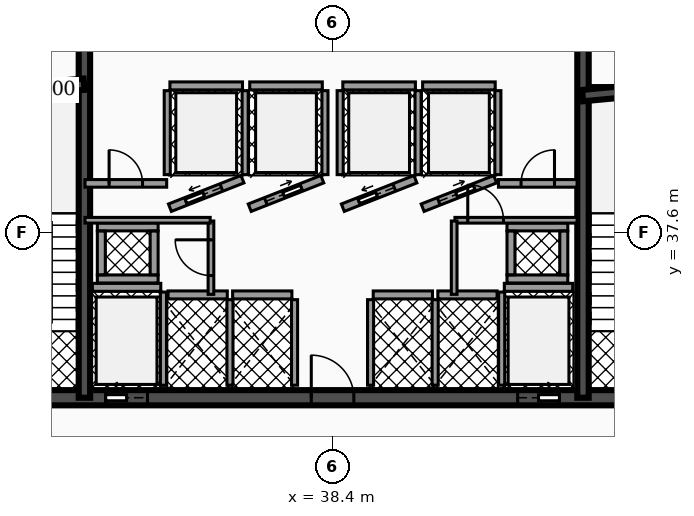
"""IFC4 building model, lengths in metres.
Left out: names, types, materials, properties, quantities, classifications, styles, units other than length and angle.
Written with IfcOpenShell. Run it as: python <this file> out.ifc"""

import sys

from ifc_helpers import new_model, si_unit, direction, frame, frame_2d, origin, place, context, subcontext, project, spatial, rectangle, extrude, element, fill, save


model = new_model("IFC4")
c1 = context("Model", 3, precision=1e-05, world=origin(), true_north=direction((0.0, 1.0)))
c2 = subcontext(c1, "Body", "Model", "MODEL_VIEW")
j1 = project(units=[si_unit("LENGTHUNIT", "METRE"), si_unit("PLANEANGLEUNIT", "RADIAN")], contexts=[c1])
p1 = place(None, origin())
s1 = spatial("IfcSite", under=j1, at=p1, CompositionType="ELEMENT")
p2 = place(p1, origin())
s2 = spatial("IfcBuilding", under=s1, at=p2, CompositionType="ELEMENT")
p3 = place(p2, frame((0.0, 0.0, 96.9)))
s3 = spatial("IfcBuildingStorey", under=s2, at=p3, CompositionType="ELEMENT", Elevation=96.9)
p4 = place(p3, frame((28.4, 33.25, 0.0), z_axis=(0.0, 0.0, 1.0), x_axis=(1.0, 0.0, 0.0)))
e1 = element("IfcWall", 1, at=p4, inside=s3, PredefinedType="SHEAR", context=c2, shape_type="SweptSolid", body=[
    extrude(rectangle(XDim=20.06, YDim=0.4, at=frame_2d((10.03, 0.0))), origin(), (0.0, 0.0, 1.0), 3.82),
])
p5 = place(p4, frame((4.03, 0.0, 0.0)))
e2 = element("IfcOpeningElement", 2, at=p5, cuts=e1, PredefinedType="OPENING", context=c2, shape_type="SweptSolid", body=[
    extrude(rectangle(XDim=1.1, YDim=2.15, at=frame_2d((0.55, 1.075))), frame((0.0, 0.21, 0.0), z_axis=(0.0, -1.0, 0.0), x_axis=(1.0, 0.0, 0.0)), (0.0, 0.0, 1.0), 0.42),
])
p6 = place(p4, frame((14.87, 0.0, 0.0)))
e3 = element("IfcOpeningElement", 3, at=p6, cuts=e1, PredefinedType="OPENING", context=c2, shape_type="SweptSolid", body=[
    extrude(rectangle(XDim=1.1, YDim=2.15, at=frame_2d((0.55, 1.075))), frame((0.0, 0.21, 0.0), z_axis=(0.0, -1.0, 0.0), x_axis=(1.0, 0.0, 0.0)), (0.0, 0.0, 1.0), 0.42),
])
p7 = place(p4, frame((1.31, 0.0, 0.0)))
e4 = element("IfcOpeningElement", 4, at=p7, cuts=e1, PredefinedType="OPENING", context=c2, shape_type="SweptSolid", body=[
    extrude(rectangle(XDim=1.1, YDim=2.2, at=frame_2d((0.55, 1.1))), frame((0.0, 0.21, 0.0), z_axis=(0.0, -1.0, 0.0), x_axis=(1.0, 0.0, 0.0)), (0.0, 0.0, 1.0), 0.42),
])
p8 = place(p4, frame((9.44, 0.0, 0.0)))
e5 = element("IfcOpeningElement", 5, at=p8, cuts=e1, PredefinedType="OPENING", context=c2, shape_type="SweptSolid", body=[
    extrude(rectangle(XDim=1.12, YDim=2.05, at=frame_2d((0.56, 1.025))), frame((0.0, 0.21, 0.0), z_axis=(0.0, -1.0, 0.0), x_axis=(1.0, 0.0, 0.0)), (0.0, 0.0, 1.0), 0.42),
])
p9 = place(p4, frame((17.65, 0.0, 0.0)))
e6 = element("IfcOpeningElement", 6, at=p9, cuts=e1, PredefinedType="OPENING", context=c2, shape_type="SweptSolid", body=[
    extrude(rectangle(XDim=1.1, YDim=2.2, at=frame_2d((0.55, 1.1))), frame((0.0, 0.21, 0.0), z_axis=(0.0, -1.0, 0.0), x_axis=(1.0, 0.0, 0.0)), (0.0, 0.0, 1.0), 0.42),
])
for number, where, z_axis, x_axis in (
    (7, (31.87, 33.25, 0.0), (0.0, 0.0, 1.0), (0.0, 1.0, 0.0)),
    (8, (44.99, 33.25, 0.0), (0.0, 0.0, 1.0), (0.0, 1.0, 0.0)),
):
    element("IfcWall", number, at=place(p3, frame(where, z_axis=z_axis, x_axis=x_axis)), inside=s3, PredefinedType="SHEAR", context=c2, shape_type="SweptSolid", body=[
        extrude(rectangle(XDim=10.2, YDim=0.3, at=frame_2d((5.1, 0.0))), origin(), (0.0, 0.0, 1.0), 3.82),
    ])
p10 = place(p3, frame((28.64, 41.2, 0.0), z_axis=(0.0, 0.0, 1.0), x_axis=(0.995687118776, 0.092774789157, 0.0)))
e9 = element("IfcWall", 9, at=p10, inside=s3, PredefinedType="SHEAR", context=c2, shape_type="SweptSolid", body=[
    extrude(rectangle(XDim=3.234, YDim=0.3, at=frame_2d((1.617, 0.0))), origin(), (0.0, 0.0, 1.0), 3.82),
])
p11 = place(p3, frame((44.98, 41.2, 0.0), z_axis=(0.0, 0.0, 1.0), x_axis=(0.995686468965, 0.09278176286, 0.0)))
e10 = element("IfcWall", 10, at=p11, inside=s3, PredefinedType="SHEAR", context=c2, shape_type="SweptSolid", body=[
    extrude(rectangle(XDim=3.234, YDim=0.3, at=frame_2d((1.617, 0.0))), origin(), (0.0, 0.0, 1.0), 3.82),
])
p12 = place(p3, frame((32.08, 36.155, 0.0), z_axis=(0.0, 0.0, 1.0), x_axis=(1.0, 0.0, 0.0)))
e11 = element("IfcWall", 11, at=p12, inside=s3, PredefinedType="SOLIDWALL", context=c2, shape_type="SweptSolid", body=[
    extrude(rectangle(XDim=1.8, YDim=0.21, at=frame_2d((0.9, 0.0))), origin(), (0.0, 0.0, 1.0), 2.792),
])
p13 = place(p3, frame((33.95, 33.58, 0.0), z_axis=(0.0, 0.0, 1.0), x_axis=(0.0, 1.0, 0.0)))
e12 = element("IfcWall", 12, at=p13, inside=s3, PredefinedType="SOLIDWALL", context=c2, shape_type="SweptSolid", body=[
    extrude(rectangle(XDim=2.45, YDim=0.16, at=frame_2d((1.225, 0.0))), origin(), (0.0, 0.0, 1.0), 2.792),
])
p14 = place(p3, frame((42.92, 36.155, 0.0), z_axis=(0.0, 0.0, 1.0), x_axis=(1.0, 0.0, 0.0)))
e13 = element("IfcWall", 13, at=p14, inside=s3, PredefinedType="SOLIDWALL", context=c2, shape_type="SweptSolid", body=[
    extrude(rectangle(XDim=1.8, YDim=0.21, at=frame_2d((0.9, 0.0))), origin(), (0.0, 0.0, 1.0), 2.792),
])
p15 = place(p3, frame((42.85, 33.58, 0.0), z_axis=(0.0, 0.0, 1.0), x_axis=(0.0, 1.0, 0.0)))
e14 = element("IfcWall", 14, at=p15, inside=s3, PredefinedType="SOLIDWALL", context=c2, shape_type="SweptSolid", body=[
    extrude(rectangle(XDim=2.45, YDim=0.16, at=frame_2d((1.225, 0.0))), origin(), (0.0, 0.0, 1.0), 2.792),
])
p16 = place(p3, frame((34.12, 38.25, 0.0), z_axis=(0.0, 0.0, 1.0), x_axis=(0.930804993012, 0.36551616241, 0.0)))
e15 = element("IfcWall", 15, at=p16, inside=s3, PredefinedType="SOLIDWALL", context=c2, shape_type="SweptSolid", body=[
    extrude(rectangle(XDim=2.052, YDim=0.21, at=frame_2d((1.026, 0.0))), origin(), (0.0, 0.0, 1.0), 2.792),
])
p17 = place(p16, frame((0.455, 0.0, 0.0)))
e16 = element("IfcOpeningElement", 16, at=p17, cuts=e15, PredefinedType="OPENING", context=c2, shape_type="SweptSolid", body=[
    extrude(rectangle(XDim=1.0, YDim=2.1, at=frame_2d((0.5, 1.05))), frame((0.0, 0.115, 0.0), z_axis=(0.0, -1.0, 0.0), x_axis=(1.0, 0.0, 0.0)), (0.0, 0.0, 1.0), 0.23),
])
p18 = place(p3, frame((34.12, 41.455, 0.0), z_axis=(0.0, 0.0, 1.0), x_axis=(1.0, 0.0, 0.0)))
e17 = element("IfcWall", 17, at=p18, inside=s3, PredefinedType="SOLIDWALL", context=c2, shape_type="SweptSolid", body=[
    extrude(rectangle(XDim=1.91, YDim=0.21, at=frame_2d((0.955, 0.0))), origin(), (0.0, 0.0, 1.0), 2.792),
])
for number, where, z_axis, x_axis in (
    (18, (34.05, 39.12, 0.0), (0.0, 0.0, 1.0), (0.0, 1.0, 0.0)),
    (19, (36.1, 39.12, 0.0), (0.0, 0.0, 1.0), (0.0, 1.0, 0.0)),
):
    element("IfcWall", number, at=place(p3, frame(where, z_axis=z_axis, x_axis=x_axis)), inside=s3, PredefinedType="SOLIDWALL", context=c2, shape_type="SweptSolid", body=[
        extrude(rectangle(XDim=2.21, YDim=0.16, at=frame_2d((1.105, 0.0))), origin(), (0.0, 0.0, 1.0), 2.792),
    ])
p19 = place(p3, frame((36.22, 38.25, 0.0), z_axis=(0.0, 0.0, 1.0), x_axis=(0.930804993012, 0.36551616241, 0.0)))
e20 = element("IfcWall", 20, at=p19, inside=s3, PredefinedType="SOLIDWALL", context=c2, shape_type="SweptSolid", body=[
    extrude(rectangle(XDim=2.052, YDim=0.21, at=frame_2d((1.026, 0.0))), origin(), (0.0, 0.0, 1.0), 2.792),
])
p20 = place(p19, frame((0.455, 0.0, 0.0)))
e21 = element("IfcOpeningElement", 21, at=p20, cuts=e20, PredefinedType="OPENING", context=c2, shape_type="SweptSolid", body=[
    extrude(rectangle(XDim=1.0, YDim=2.1, at=frame_2d((0.5, 1.05))), frame((0.0, 0.115, 0.0), z_axis=(0.0, -1.0, 0.0), x_axis=(1.0, 0.0, 0.0)), (0.0, 0.0, 1.0), 0.23),
])
p21 = place(p3, frame((36.22, 41.455, 0.0), z_axis=(0.0, 0.0, 1.0), x_axis=(1.0, 0.0, 0.0)))
e22 = element("IfcWall", 22, at=p21, inside=s3, PredefinedType="SOLIDWALL", context=c2, shape_type="SweptSolid", body=[
    extrude(rectangle(XDim=1.91, YDim=0.21, at=frame_2d((0.955, 0.0))), origin(), (0.0, 0.0, 1.0), 2.792),
])
p22 = place(p3, frame((38.2, 39.12, 0.0), z_axis=(0.0, 0.0, 1.0), x_axis=(0.0, 1.0, 0.0)))
e23 = element("IfcWall", 23, at=p22, inside=s3, PredefinedType="SOLIDWALL", context=c2, shape_type="SweptSolid", body=[
    extrude(rectangle(XDim=2.21, YDim=0.16, at=frame_2d((1.105, 0.0))), origin(), (0.0, 0.0, 1.0), 2.792),
])
p23 = place(p3, frame((38.67, 38.25, 0.0), z_axis=(0.0, 0.0, 1.0), x_axis=(0.930820886763, 0.3654756856, 0.0)))
e24 = element("IfcWall", 24, at=p23, inside=s3, PredefinedType="SOLIDWALL", context=c2, shape_type="SweptSolid", body=[
    extrude(rectangle(XDim=2.052, YDim=0.21, at=frame_2d((1.026, 0.0))), origin(), (0.0, 0.0, 1.0), 2.792),
])
p24 = place(p23, frame((0.455, 0.0, 0.0)))
e25 = element("IfcOpeningElement", 25, at=p24, cuts=e24, PredefinedType="OPENING", context=c2, shape_type="SweptSolid", body=[
    extrude(rectangle(XDim=1.0, YDim=2.1, at=frame_2d((0.5, 1.05))), frame((0.0, 0.115, 0.0), z_axis=(0.0, -1.0, 0.0), x_axis=(1.0, 0.0, 0.0)), (0.0, 0.0, 1.0), 0.23),
])
p25 = place(p3, frame((38.67, 41.455, 0.0), z_axis=(0.0, 0.0, 1.0), x_axis=(1.0, 0.0, 0.0)))
e26 = element("IfcWall", 26, at=p25, inside=s3, PredefinedType="SOLIDWALL", context=c2, shape_type="SweptSolid", body=[
    extrude(rectangle(XDim=1.91, YDim=0.21, at=frame_2d((0.955, 0.0))), origin(), (0.0, 0.0, 1.0), 2.792),
])
for number, where, z_axis, x_axis in (
    (27, (38.6, 39.12, 0.0), (0.0, 0.0, 1.0), (0.0, 1.0, 0.0)),
    (28, (40.65, 39.12, 0.0), (0.0, 0.0, 1.0), (0.0, 1.0, 0.0)),
):
    element("IfcWall", number, at=place(p3, frame(where, z_axis=z_axis, x_axis=x_axis)), inside=s3, PredefinedType="SOLIDWALL", context=c2, shape_type="SweptSolid", body=[
        extrude(rectangle(XDim=2.21, YDim=0.16, at=frame_2d((1.105, 0.0))), origin(), (0.0, 0.0, 1.0), 2.792),
    ])
p26 = place(p3, frame((40.77, 38.25, 0.0), z_axis=(0.0, 0.0, 1.0), x_axis=(0.930804993012, 0.36551616241, 0.0)))
e29 = element("IfcWall", 29, at=p26, inside=s3, PredefinedType="SOLIDWALL", context=c2, shape_type="SweptSolid", body=[
    extrude(rectangle(XDim=2.052, YDim=0.21, at=frame_2d((1.026, 0.0))), origin(), (0.0, 0.0, 1.0), 2.792),
])
p27 = place(p26, frame((0.455, 0.0, 0.0)))
e30 = element("IfcOpeningElement", 30, at=p27, cuts=e29, PredefinedType="OPENING", context=c2, shape_type="SweptSolid", body=[
    extrude(rectangle(XDim=1.0, YDim=2.1, at=frame_2d((0.5, 1.05))), frame((0.0, 0.115, 0.0), z_axis=(0.0, -1.0, 0.0), x_axis=(1.0, 0.0, 0.0)), (0.0, 0.0, 1.0), 0.23),
])
p28 = place(p3, frame((40.77, 41.455, 0.0), z_axis=(0.0, 0.0, 1.0), x_axis=(1.0, 0.0, 0.0)))
e31 = element("IfcWall", 31, at=p28, inside=s3, PredefinedType="SOLIDWALL", context=c2, shape_type="SweptSolid", body=[
    extrude(rectangle(XDim=1.91, YDim=0.21, at=frame_2d((0.955, 0.0))), origin(), (0.0, 0.0, 1.0), 2.792),
])
p29 = place(p3, frame((42.75, 39.12, 0.0), z_axis=(0.0, 0.0, 1.0), x_axis=(0.0, 1.0, 0.0)))
e32 = element("IfcWall", 32, at=p29, inside=s3, PredefinedType="SOLIDWALL", context=c2, shape_type="SweptSolid", body=[
    extrude(rectangle(XDim=2.21, YDim=0.16, at=frame_2d((1.105, 0.0))), origin(), (0.0, 0.0, 1.0), 2.792),
])
p30 = place(p3, frame((34.07, 35.955, 0.0), z_axis=(0.0, 0.0, 1.0), x_axis=(1.0, 0.0, 0.0)))
e33 = element("IfcWall", 33, at=p30, inside=s3, PredefinedType="SOLIDWALL", context=c2, shape_type="SweptSolid", body=[
    extrude(rectangle(XDim=1.56, YDim=0.21, at=frame_2d((0.78, 0.0))), origin(), (0.0, 0.0, 1.0), 2.792),
])
p31 = place(p3, frame((35.7, 33.58, 0.0), z_axis=(0.0, 0.0, 1.0), x_axis=(0.0, 1.0, 0.0)))
e34 = element("IfcWall", 34, at=p31, inside=s3, PredefinedType="SOLIDWALL", context=c2, shape_type="SweptSolid", body=[
    extrude(rectangle(XDim=2.25, YDim=0.16, at=frame_2d((1.125, 0.0))), origin(), (0.0, 0.0, 1.0), 2.792),
])
p32 = place(p3, frame((35.77, 35.955, 0.0), z_axis=(0.0, 0.0, 1.0), x_axis=(1.0, 0.0, 0.0)))
e35 = element("IfcWall", 35, at=p32, inside=s3, PredefinedType="SOLIDWALL", context=c2, shape_type="SweptSolid", body=[
    extrude(rectangle(XDim=1.56, YDim=0.21, at=frame_2d((0.78, 0.0))), origin(), (0.0, 0.0, 1.0), 2.792),
])
p33 = place(p3, frame((37.4, 33.58, 0.0), z_axis=(0.0, 0.0, 1.0), x_axis=(0.0, 1.0, 0.0)))
e36 = element("IfcWall", 36, at=p33, inside=s3, PredefinedType="SOLIDWALL", context=c2, shape_type="SweptSolid", body=[
    extrude(rectangle(XDim=2.25, YDim=0.16, at=frame_2d((1.125, 0.0))), origin(), (0.0, 0.0, 1.0), 2.792),
])
p34 = place(p3, frame((39.47, 35.955, 0.0), z_axis=(0.0, 0.0, 1.0), x_axis=(1.0, 0.0, 0.0)))
e37 = element("IfcWall", 37, at=p34, inside=s3, PredefinedType="SOLIDWALL", context=c2, shape_type="SweptSolid", body=[
    extrude(rectangle(XDim=1.56, YDim=0.21, at=frame_2d((0.78, 0.0))), origin(), (0.0, 0.0, 1.0), 2.792),
])
for number, where, z_axis, x_axis in (
    (38, (39.4, 33.58, 0.0), (0.0, 0.0, 1.0), (0.0, 1.0, 0.0)),
    (39, (41.1, 33.58, 0.0), (0.0, 0.0, 1.0), (0.0, 1.0, 0.0)),
):
    element("IfcWall", number, at=place(p3, frame(where, z_axis=z_axis, x_axis=x_axis)), inside=s3, PredefinedType="SOLIDWALL", context=c2, shape_type="SweptSolid", body=[
        extrude(rectangle(XDim=2.25, YDim=0.16, at=frame_2d((1.125, 0.0))), origin(), (0.0, 0.0, 1.0), 2.792),
    ])
p35 = place(p3, frame((41.17, 35.955, 0.0), z_axis=(0.0, 0.0, 1.0), x_axis=(1.0, 0.0, 0.0)))
e40 = element("IfcWall", 40, at=p35, inside=s3, PredefinedType="SOLIDWALL", context=c2, shape_type="SweptSolid", body=[
    extrude(rectangle(XDim=1.56, YDim=0.21, at=frame_2d((0.78, 0.0))), origin(), (0.0, 0.0, 1.0), 2.792),
])
for number, where, z_axis, x_axis in (
    (41, (32.21, 36.375, 0.0), (0.0, 0.0, 1.0), (1.0, 0.0, 0.0)),
    (42, (32.21, 37.745, 0.0), (0.0, 0.0, 1.0), (1.0, 0.0, 0.0)),
):
    element("IfcWall", number, at=place(p3, frame(where, z_axis=z_axis, x_axis=x_axis)), inside=s3, PredefinedType="SOLIDWALL", context=c2, shape_type="SweptSolid", body=[
        extrude(rectangle(XDim=1.6, YDim=0.21, at=frame_2d((0.8, 0.0))), origin(), (0.0, 0.0, 1.0), 3.82),
    ])
for number, where, z_axis, x_axis in (
    (43, (32.315, 36.485, 0.0), (0.0, 0.0, 1.0), (0.0, 1.0, 0.0)),
    (44, (33.705, 36.485, 0.0), (0.0, 0.0, 1.0), (0.0, 1.0, 0.0)),
):
    element("IfcWall", number, at=place(p3, frame(where, z_axis=z_axis, x_axis=x_axis)), inside=s3, PredefinedType="SOLIDWALL", context=c2, shape_type="SweptSolid", body=[
        extrude(rectangle(XDim=1.15, YDim=0.21, at=frame_2d((0.575, 0.0))), origin(), (0.0, 0.0, 1.0), 3.82),
    ])
for number, where, z_axis, x_axis in (
    (45, (42.99, 36.375, 0.0), (0.0, 0.0, 1.0), (1.0, 0.0, 0.0)),
    (46, (42.99, 37.745, 0.0), (0.0, 0.0, 1.0), (1.0, 0.0, 0.0)),
):
    element("IfcWall", number, at=place(p3, frame(where, z_axis=z_axis, x_axis=x_axis)), inside=s3, PredefinedType="SOLIDWALL", context=c2, shape_type="SweptSolid", body=[
        extrude(rectangle(XDim=1.6, YDim=0.21, at=frame_2d((0.8, 0.0))), origin(), (0.0, 0.0, 1.0), 3.82),
    ])
for number, where, z_axis, x_axis in (
    (47, (43.095, 36.485, 0.0), (0.0, 0.0, 1.0), (0.0, 1.0, 0.0)),
    (48, (44.485, 36.485, 0.0), (0.0, 0.0, 1.0), (0.0, 1.0, 0.0)),
):
    element("IfcWall", number, at=place(p3, frame(where, z_axis=z_axis, x_axis=x_axis)), inside=s3, PredefinedType="SOLIDWALL", context=c2, shape_type="SweptSolid", body=[
        extrude(rectangle(XDim=1.15, YDim=0.21, at=frame_2d((0.575, 0.0))), origin(), (0.0, 0.0, 1.0), 3.82),
    ])
p36 = place(p3, frame((35.2, 35.97, 0.0), z_axis=(0.0, 0.0, 1.0), x_axis=(0.0, 1.0, 0.0)))
e49 = element("IfcWall", 49, at=p36, inside=s3, PredefinedType="PARTITIONING", context=c2, shape_type="SweptSolid", body=[
    extrude(rectangle(XDim=1.93, YDim=0.15, at=frame_2d((0.965, 0.0))), origin(), (0.0, 0.0, 1.0), 2.777),
])
p37 = place(p36, frame((0.495, 0.0, 0.0)))
e50 = element("IfcOpeningElement", 50, at=p37, cuts=e49, PredefinedType="OPENING", context=c2, shape_type="SweptSolid", body=[
    extrude(rectangle(XDim=0.94, YDim=2.05, at=frame_2d((0.47, 1.025))), frame((0.0, 0.085, 0.0), z_axis=(0.0, -1.0, 0.0), x_axis=(1.0, 0.0, 0.0)), (0.0, 0.0, 1.0), 0.17),
])
p38 = place(p3, frame((31.885, 37.92, 0.0), z_axis=(0.0, 0.0, 1.0), x_axis=(1.0, 0.0, 0.0)))
e51 = element("IfcWall", 51, at=p38, inside=s3, PredefinedType="PARTITIONING", context=c2, shape_type="SweptSolid", body=[
    extrude(rectangle(XDim=3.295, YDim=0.15, at=frame_2d((1.647, 0.0))), origin(), (0.0, 0.0, 1.0), 2.777),
])
p39 = place(p3, frame((31.885, 38.89, 0.0), z_axis=(0.0, 0.0, 1.0), x_axis=(1.0, 0.0, 0.0)))
e52 = element("IfcWall", 52, at=p39, inside=s3, PredefinedType="PARTITIONING", context=c2, shape_type="SweptSolid", body=[
    extrude(rectangle(XDim=2.15, YDim=0.2, at=frame_2d((1.075, 0.0))), origin(), (0.0, 0.0, 1.0), 2.777),
])
p40 = place(p39, frame((0.635, 0.0, 0.0)))
e53 = element("IfcOpeningElement", 53, at=p40, cuts=e52, PredefinedType="OPENING", context=c2, shape_type="SweptSolid", body=[
    extrude(rectangle(XDim=0.88, YDim=2.05, at=frame_2d((0.44, 1.025))), frame((0.0, 0.11, 0.0), z_axis=(0.0, -1.0, 0.0), x_axis=(1.0, 0.0, 0.0)), (0.0, 0.0, 1.0), 0.22),
])
p41 = place(p3, frame((42.765, 38.89, 0.0), z_axis=(0.0, 0.0, 1.0), x_axis=(1.0, 0.0, 0.0)))
e54 = element("IfcWall", 54, at=p41, inside=s3, PredefinedType="PARTITIONING", context=c2, shape_type="SweptSolid", body=[
    extrude(rectangle(XDim=2.07, YDim=0.2, at=frame_2d((1.035, 0.0))), origin(), (0.0, 0.0, 1.0), 2.777),
])
p42 = place(p41, frame((0.595, 0.0, 0.0)))
e55 = element("IfcOpeningElement", 55, at=p42, cuts=e54, PredefinedType="OPENING", context=c2, shape_type="SweptSolid", body=[
    extrude(rectangle(XDim=0.88, YDim=2.05, at=frame_2d((0.44, 1.025))), frame((0.0, 0.11, 0.0), z_axis=(0.0, -1.0, 0.0), x_axis=(1.0, 0.0, 0.0)), (0.0, 0.0, 1.0), 0.22),
])
p43 = place(p3, frame((41.62, 37.92, 0.0), z_axis=(0.0, 0.0, 1.0), x_axis=(1.0, 0.0, 0.0)))
e56 = element("IfcWall", 56, at=p43, inside=s3, PredefinedType="PARTITIONING", context=c2, shape_type="SweptSolid", body=[
    extrude(rectangle(XDim=3.215, YDim=0.15, at=frame_2d((1.607, 0.0))), origin(), (0.0, 0.0, 1.0), 2.777),
])
p44 = place(p43, frame((0.337, 0.0, 0.0)))
e57 = element("IfcOpeningElement", 57, at=p44, cuts=e56, PredefinedType="OPENING", context=c2, shape_type="SweptSolid", body=[
    extrude(rectangle(XDim=0.94, YDim=2.05, at=frame_2d((0.47, 1.025))), frame((0.0, 0.085, 0.0), z_axis=(0.0, -1.0, 0.0), x_axis=(1.0, 0.0, 0.0)), (0.0, 0.0, 1.0), 0.17),
])
p45 = place(p3, frame((41.6, 35.97, 0.0), z_axis=(0.0, 0.0, 1.0), x_axis=(0.0, 1.0, 0.0)))
e58 = element("IfcWall", 58, at=p45, inside=s3, PredefinedType="PARTITIONING", context=c2, shape_type="SweptSolid", body=[
    extrude(rectangle(XDim=1.93, YDim=0.15, at=frame_2d((0.965, 0.0))), origin(), (0.0, 0.0, 1.0), 2.777),
])
p46 = place(p5, origin())
e59 = element("IfcDoor", 59, at=p46, inside=s3, OperationType="SLIDING_TO_LEFT", PredefinedType="DOOR", context=c2, shape_type="SweptSolid", body=[
    extrude(rectangle(XDim=1.1, YDim=2.15, at=frame_2d((0.55, 1.075))), frame((0.0, 0.025, 0.0), z_axis=(0.0, -1.0, 0.0), x_axis=(1.0, 0.0, 0.0)), (0.0, 0.0, 1.0), 0.05),
])
fill(e2, e59)
p47 = place(p6, origin())
e60 = element("IfcDoor", 60, at=p47, inside=s3, OperationType="SLIDING_TO_RIGHT", PredefinedType="DOOR", context=c2, shape_type="SweptSolid", body=[
    extrude(rectangle(XDim=1.1, YDim=2.15, at=frame_2d((0.55, 1.075))), frame((0.0, 0.025, 0.0), z_axis=(0.0, -1.0, 0.0), x_axis=(1.0, 0.0, 0.0)), (0.0, 0.0, 1.0), 0.05),
])
fill(e3, e60)
p48 = place(p17, origin())
e61 = element("IfcDoor", 61, at=p48, inside=s3, OperationType="SLIDING_TO_LEFT", PredefinedType="DOOR", context=c2, shape_type="SweptSolid", body=[
    extrude(rectangle(XDim=1.0, YDim=2.1, at=frame_2d((0.5, 1.05))), frame((0.0, 0.025, 0.0), z_axis=(0.0, -1.0, 0.0), x_axis=(1.0, 0.0, 0.0)), (0.0, 0.0, 1.0), 0.05),
])
fill(e16, e61)
p49 = place(p20, origin())
e62 = element("IfcDoor", 62, at=p49, inside=s3, OperationType="SLIDING_TO_RIGHT", PredefinedType="DOOR", context=c2, shape_type="SweptSolid", body=[
    extrude(rectangle(XDim=1.0, YDim=2.1, at=frame_2d((0.5, 1.05))), frame((0.0, 0.025, 0.0), z_axis=(0.0, -1.0, 0.0), x_axis=(1.0, 0.0, 0.0)), (0.0, 0.0, 1.0), 0.05),
])
fill(e21, e62)
p50 = place(p24, origin())
e63 = element("IfcDoor", 63, at=p50, inside=s3, OperationType="SLIDING_TO_LEFT", PredefinedType="DOOR", context=c2, shape_type="SweptSolid", body=[
    extrude(rectangle(XDim=1.0, YDim=2.1, at=frame_2d((0.5, 1.05))), frame((0.0, 0.025, 0.0), z_axis=(0.0, -1.0, 0.0), x_axis=(1.0, 0.0, 0.0)), (0.0, 0.0, 1.0), 0.05),
])
fill(e25, e63)
p51 = place(p27, origin())
e64 = element("IfcDoor", 64, at=p51, inside=s3, OperationType="SLIDING_TO_RIGHT", PredefinedType="DOOR", context=c2, shape_type="SweptSolid", body=[
    extrude(rectangle(XDim=1.0, YDim=2.1, at=frame_2d((0.5, 1.05))), frame((0.0, 0.025, 0.0), z_axis=(0.0, -1.0, 0.0), x_axis=(1.0, 0.0, 0.0)), (0.0, 0.0, 1.0), 0.05),
])
fill(e30, e64)
p52 = place(p8, origin())
e65 = element("IfcDoor", 65, at=p52, inside=s3, OperationType="SINGLE_SWING_LEFT", PredefinedType="DOOR", context=c2, shape_type="SweptSolid", body=[
    extrude(rectangle(XDim=1.12, YDim=2.05, at=frame_2d((0.56, 1.025))), frame((0.0, 0.025, 0.0), z_axis=(0.0, -1.0, 0.0), x_axis=(1.0, 0.0, 0.0)), (0.0, 0.0, 1.0), 0.05),
])
fill(e5, e65)
p53 = place(p37, origin())
e66 = element("IfcDoor", 66, at=p53, inside=s3, OperationType="SINGLE_SWING_RIGHT", PredefinedType="DOOR", context=c2, shape_type="SweptSolid", body=[
    extrude(rectangle(XDim=0.94, YDim=2.05, at=frame_2d((0.47, 1.025))), frame((0.0, 0.025, 0.0), z_axis=(0.0, -1.0, 0.0), x_axis=(1.0, 0.0, 0.0)), (0.0, 0.0, 1.0), 0.05),
])
fill(e50, e66)
p54 = place(p40, origin())
e67 = element("IfcDoor", 67, at=p54, inside=s3, OperationType="SINGLE_SWING_LEFT", PredefinedType="DOOR", context=c2, shape_type="SweptSolid", body=[
    extrude(rectangle(XDim=0.88, YDim=2.05, at=frame_2d((0.44, 1.025))), frame((0.0, 0.025, 0.0), z_axis=(0.0, -1.0, 0.0), x_axis=(1.0, 0.0, 0.0)), (0.0, 0.0, 1.0), 0.05),
])
fill(e53, e67)
p55 = place(p42, origin())
e68 = element("IfcDoor", 68, at=p55, inside=s3, OperationType="SINGLE_SWING_RIGHT", PredefinedType="DOOR", context=c2, shape_type="SweptSolid", body=[
    extrude(rectangle(XDim=0.88, YDim=2.05, at=frame_2d((0.44, 1.025))), frame((0.0, 0.025, 0.0), z_axis=(0.0, -1.0, 0.0), x_axis=(1.0, 0.0, 0.0)), (0.0, 0.0, 1.0), 0.05),
])
fill(e55, e68)
p56 = place(p44, origin())
e69 = element("IfcDoor", 69, at=p56, inside=s3, OperationType="SINGLE_SWING_LEFT", PredefinedType="DOOR", context=c2, shape_type="SweptSolid", body=[
    extrude(rectangle(XDim=0.94, YDim=2.05, at=frame_2d((0.47, 1.025))), frame((0.0, 0.025, 0.0), z_axis=(0.0, -1.0, 0.0), x_axis=(1.0, 0.0, 0.0)), (0.0, 0.0, 1.0), 0.05),
])
fill(e57, e69)
save(model, sys.argv[1])
